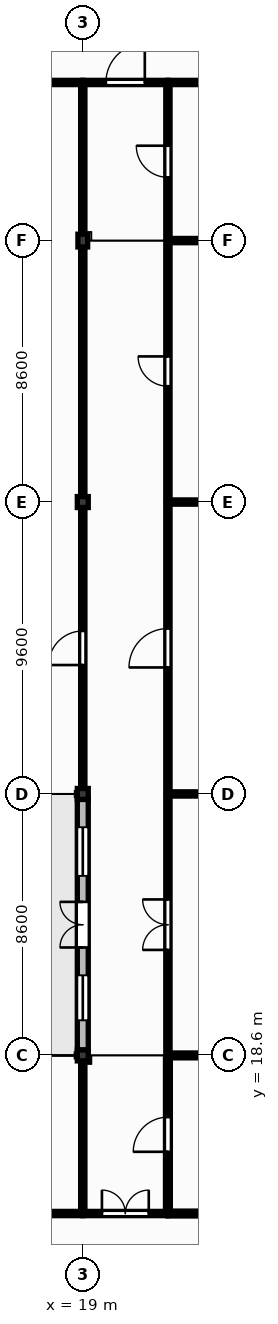
"""IFC4 building model, lengths in metres.
Left out: names, types, materials, properties, quantities, classifications, styles, units other than length and angle.
Written with IfcOpenShell. Run it as: python <this file> out.ifc"""

import sys

from ifc_helpers import new_model, si_unit, direction, frame, frame_2d, origin, origin_2d, place, context, subcontext, project, spatial, rectangle, extrude, element, fill, save


model = new_model("IFC4")
c1 = context("Model", 3, precision=1e-05, world=origin(), true_north=direction((0.0, 1.0)))
c2 = subcontext(c1, "Body", "Model", "MODEL_VIEW")
j1 = project(units=[si_unit("LENGTHUNIT", "METRE"), si_unit("PLANEANGLEUNIT", "RADIAN")], contexts=[c1])
p1 = place(None, origin())
s1 = spatial("IfcSite", under=j1, at=p1, CompositionType="ELEMENT")
p2 = place(p1, origin())
s2 = spatial("IfcBuilding", under=s1, at=p2, CompositionType="ELEMENT")
p3 = place(p2, frame((0.0, 0.0, 4.5)))
s3 = spatial("IfcBuildingStorey", under=s2, at=p3, CompositionType="ELEMENT", Elevation=4.5)
for number, where, z_axis, x_axis in (
    (1, (19.0, 18.6, 0.0), (0.0, 0.0, 1.0), (1.0, 0.0, 0.0)),
    (2, (19.0, 27.2, 0.0), (0.0, 0.0, 1.0), (1.0, 0.0, 0.0)),
    (3, (19.0, 36.8, 0.0), (0.0, 0.0, 1.0), (1.0, 0.0, 0.0)),
):
    element("IfcColumn", number, at=place(p3, frame(where, z_axis=z_axis, x_axis=x_axis)), inside=s3, PredefinedType="COLUMN", context=c2, shape_type="SweptSolid", body=[
        extrude(rectangle(XDim=0.36, YDim=0.36, at=origin_2d()), origin(), (0.0, 0.0, 1.0), 4.26),
    ])
p4 = place(p3, frame((19.0, 45.4, 0.0), z_axis=(0.0, 0.0, 1.0), x_axis=(1.0, 0.0, 0.0)))
e4 = element("IfcColumn", 4, at=p4, inside=s3, PredefinedType="COLUMN", context=c2, shape_type="SweptSolid", body=[
    extrude(rectangle(XDim=0.32, YDim=0.42, at=origin_2d()), origin(), (0.0, 0.0, 1.0), 4.26),
])
p5 = place(p3, frame((19.0, 18.78, 0.0), z_axis=(0.0, 0.0, 1.0), x_axis=(0.0, 1.0, 0.0)))
e5 = element("IfcWall", 5, at=p5, inside=s3, PredefinedType="SOLIDWALL", context=c2, shape_type="SweptSolid", body=[
    extrude(rectangle(XDim=8.24, YDim=0.36, at=frame_2d((4.12, 0.0))), origin(), (0.0, 0.0, 1.0), 3.8),
])
p6 = place(p5, frame((3.37, 0.0, 0.0)))
e6 = element("IfcOpeningElement", 6, at=p6, cuts=e5, PredefinedType="OPENING", context=c2, shape_type="SweptSolid", body=[
    extrude(rectangle(XDim=1.5, YDim=2.3, at=frame_2d((0.75, 1.15))), frame((0.0, 0.19, 0.0), z_axis=(0.0, -1.0, 0.0), x_axis=(1.0, 0.0, 0.0)), (0.0, 0.0, 1.0), 0.38),
])
p7 = place(p5, frame((0.975, 0.0, 1.0)))
e7 = element("IfcOpeningElement", 7, at=p7, cuts=e5, PredefinedType="OPENING", context=c2, shape_type="SweptSolid", body=[
    extrude(rectangle(XDim=1.48, YDim=2.2, at=frame_2d((0.74, 1.1))), frame((0.0, 0.19, 0.0), z_axis=(0.0, -1.0, 0.0), x_axis=(1.0, 0.0, 0.0)), (0.0, 0.0, 1.0), 0.38),
])
p8 = place(p5, frame((5.725, 0.0, 1.0)))
e8 = element("IfcOpeningElement", 8, at=p8, cuts=e5, PredefinedType="OPENING", context=c2, shape_type="SweptSolid", body=[
    extrude(rectangle(XDim=1.6, YDim=2.2, at=frame_2d((0.8, 1.1))), frame((0.0, 0.19, 0.0), z_axis=(0.0, -1.0, 0.0), x_axis=(1.0, 0.0, 0.0)), (0.0, 0.0, 1.0), 0.38),
])
p9 = place(p3, frame((11.8, 13.4, 0.0), z_axis=(0.0, 0.0, 1.0), x_axis=(1.0, 0.0, 0.0)))
e9 = element("IfcWall", 9, at=p9, inside=s3, PredefinedType="PARTITIONING", context=c2, shape_type="SweptSolid", body=[
    extrude(rectangle(XDim=7.2, YDim=0.14, at=frame_2d((3.6, 0.0))), origin(), (0.0, 0.0, 1.0), 4.18),
])
p10 = place(p9, frame((3.08, 0.0, 0.0)))
e10 = element("IfcOpeningElement", 10, at=p10, cuts=e9, PredefinedType="OPENING", context=c2, shape_type="SweptSolid", body=[
    extrude(rectangle(XDim=1.04, YDim=2.1, at=frame_2d((0.52, 1.05))), frame((0.0, 0.08, 0.0), z_axis=(0.0, -1.0, 0.0), x_axis=(1.0, 0.0, 0.0)), (0.0, 0.0, 1.0), 0.16),
])
p11 = place(p3, frame((15.8, 50.6, 0.0), z_axis=(0.0, 0.0, 1.0), x_axis=(1.0, 0.0, 0.0)))
e11 = element("IfcWall", 11, at=p11, inside=s3, PredefinedType="PARTITIONING", context=c2, shape_type="SweptSolid", body=[
    extrude(rectangle(XDim=3.2, YDim=0.14, at=frame_2d((1.6, 0.0))), origin(), (0.0, 0.0, 1.0), 4.18),
])
p12 = place(p11, frame((1.08, 0.0, 0.0)))
e12 = element("IfcOpeningElement", 12, at=p12, cuts=e11, PredefinedType="OPENING", context=c2, shape_type="SweptSolid", body=[
    extrude(rectangle(XDim=1.04, YDim=2.1, at=frame_2d((0.52, 1.05))), frame((0.0, 0.08, 0.0), z_axis=(0.0, -1.0, 0.0), x_axis=(1.0, 0.0, 0.0)), (0.0, 0.0, 1.0), 0.16),
])
p13 = place(p3, frame((19.0, 13.47, 0.0), z_axis=(0.0, 0.0, 1.0), x_axis=(0.0, 1.0, 0.0)))
e13 = element("IfcWall", 13, at=p13, inside=s3, PredefinedType="PARTITIONING", context=c2, shape_type="SweptSolid", body=[
    extrude(rectangle(XDim=4.95, YDim=0.14, at=frame_2d((2.475, 0.0))), origin(), (0.0, 0.0, 1.0), 3.74),
])
p14 = place(p3, frame((19.0, 13.4, 0.0), z_axis=(0.0, 0.0, 1.0), x_axis=(1.0, 0.0, 0.0)))
e14 = element("IfcWall", 14, at=p14, inside=s3, PredefinedType="PARTITIONING", context=c2, shape_type="SweptSolid", body=[
    extrude(rectangle(XDim=2.8, YDim=0.14, at=frame_2d((1.4, 0.0))), origin(), (0.0, 0.0, 1.0), 4.18),
])
p15 = place(p14, frame((0.63, 0.0, 0.0)))
e15 = element("IfcOpeningElement", 15, at=p15, cuts=e14, PredefinedType="OPENING", context=c2, shape_type="SweptSolid", body=[
    extrude(rectangle(XDim=1.54, YDim=2.25, at=frame_2d((0.77, 1.125))), frame((0.0, 0.08, 0.0), z_axis=(0.0, -1.0, 0.0), x_axis=(1.0, 0.0, 0.0)), (0.0, 0.0, 1.0), 0.16),
])
p16 = place(p3, frame((19.0, 27.38, 0.0), z_axis=(0.0, 0.0, 1.0), x_axis=(0.0, 1.0, 0.0)))
e16 = element("IfcWall", 16, at=p16, inside=s3, PredefinedType="PARTITIONING", context=c2, shape_type="SweptSolid", body=[
    extrude(rectangle(XDim=9.24, YDim=0.14, at=frame_2d((4.62, 0.0))), origin(), (0.0, 0.0, 1.0), 3.62),
])
p17 = place(p16, frame((4.06, 0.0, 0.0)))
e17 = element("IfcOpeningElement", 17, at=p17, cuts=e16, PredefinedType="OPENING", context=c2, shape_type="SweptSolid", body=[
    extrude(rectangle(XDim=1.12, YDim=2.15, at=frame_2d((0.56, 1.075))), frame((0.0, 0.08, 0.0), z_axis=(0.0, -1.0, 0.0), x_axis=(1.0, 0.0, 0.0)), (0.0, 0.0, 1.0), 0.16),
])
p18 = place(p3, frame((19.0, 36.98, 0.0), z_axis=(0.0, 0.0, 1.0), x_axis=(0.0, 1.0, 0.0)))
e18 = element("IfcWall", 18, at=p18, inside=s3, PredefinedType="PARTITIONING", context=c2, shape_type="SweptSolid", body=[
    extrude(rectangle(XDim=8.21, YDim=0.14, at=frame_2d((4.105, 0.0))), origin(), (0.0, 0.0, 1.0), 3.62),
])
p19 = place(p3, frame((19.0, 45.61, 0.0), z_axis=(0.0, 0.0, 1.0), x_axis=(0.0, 1.0, 0.0)))
e19 = element("IfcWall", 19, at=p19, inside=s3, PredefinedType="PARTITIONING", context=c2, shape_type="SweptSolid", body=[
    extrude(rectangle(XDim=4.92, YDim=0.14, at=frame_2d((2.46, 0.0))), origin(), (0.0, 0.0, 1.0), 3.74),
])
p20 = place(p3, frame((19.0, 50.6, 0.0), z_axis=(0.0, 0.0, 1.0), x_axis=(1.0, 0.0, 0.0)))
e20 = element("IfcWall", 20, at=p20, inside=s3, PredefinedType="PARTITIONING", context=c2, shape_type="SweptSolid", body=[
    extrude(rectangle(XDim=2.8, YDim=0.14, at=frame_2d((1.4, 0.0))), origin(), (0.0, 0.0, 1.0), 4.18),
])
p21 = place(p20, frame((0.76, 0.0, 0.0)))
e21 = element("IfcOpeningElement", 21, at=p21, cuts=e20, PredefinedType="OPENING", context=c2, shape_type="SweptSolid", body=[
    extrude(rectangle(XDim=1.28, YDim=2.2, at=frame_2d((0.64, 1.1))), frame((0.0, 0.08, 0.0), z_axis=(0.0, -1.0, 0.0), x_axis=(1.0, 0.0, 0.0)), (0.0, 0.0, 1.0), 0.16),
])
p22 = place(p3, frame((21.8, 13.47, 0.0), z_axis=(0.0, 0.0, 1.0), x_axis=(0.0, 1.0, 0.0)))
e22 = element("IfcWall", 22, at=p22, inside=s3, PredefinedType="PARTITIONING", context=c2, shape_type="SweptSolid", body=[
    extrude(rectangle(XDim=5.06, YDim=0.16, at=frame_2d((2.53, 0.0))), origin(), (0.0, 0.0, 1.0), 4.18),
])
p23 = place(p22, frame((1.96, 0.0, 0.0)))
e23 = element("IfcOpeningElement", 23, at=p23, cuts=e22, PredefinedType="OPENING", context=c2, shape_type="SweptSolid", body=[
    extrude(rectangle(XDim=1.14, YDim=2.15, at=frame_2d((0.57, 1.075))), frame((0.0, 0.09, 0.0), z_axis=(0.0, -1.0, 0.0), x_axis=(1.0, 0.0, 0.0)), (0.0, 0.0, 1.0), 0.18),
])
p24 = place(p3, frame((21.8, 13.4, 0.0), z_axis=(0.0, 0.0, 1.0), x_axis=(1.0, 0.0, 0.0)))
e24 = element("IfcWall", 24, at=p24, inside=s3, PredefinedType="PARTITIONING", context=c2, shape_type="SweptSolid", body=[
    extrude(rectangle(XDim=4.4, YDim=0.16, at=frame_2d((2.2, 0.0))), origin(), (0.0, 0.0, 1.0), 4.18),
])
p25 = place(p3, frame((21.8, 18.67, 0.0), z_axis=(0.0, 0.0, 1.0), x_axis=(0.0, 1.0, 0.0)))
e25 = element("IfcWall", 25, at=p25, inside=s3, PredefinedType="PARTITIONING", context=c2, shape_type="SweptSolid", body=[
    extrude(rectangle(XDim=8.46, YDim=0.14, at=frame_2d((4.23, 0.0))), origin(), (0.0, 0.0, 1.0), 4.18),
])
p26 = place(p25, frame((3.4, 0.0, 0.0)))
e26 = element("IfcOpeningElement", 26, at=p26, cuts=e25, PredefinedType="OPENING", context=c2, shape_type="SweptSolid", body=[
    extrude(rectangle(XDim=1.66, YDim=2.3, at=frame_2d((0.83, 1.15))), frame((0.0, 0.08, 0.0), z_axis=(0.0, -1.0, 0.0), x_axis=(1.0, 0.0, 0.0)), (0.0, 0.0, 1.0), 0.16),
])
p27 = place(p3, frame((21.8, 18.6, 0.0), z_axis=(0.0, 0.0, 1.0), x_axis=(1.0, 0.0, 0.0)))
e27 = element("IfcWall", 27, at=p27, inside=s3, PredefinedType="PARTITIONING", context=c2, shape_type="SweptSolid", body=[
    extrude(rectangle(XDim=4.24, YDim=0.16, at=frame_2d((2.12, 0.0))), origin(), (0.0, 0.0, 1.0), 3.62),
])
p28 = place(p3, frame((21.8, 27.27, 0.0), z_axis=(0.0, 0.0, 1.0), x_axis=(0.0, 1.0, 0.0)))
e28 = element("IfcWall", 28, at=p28, inside=s3, PredefinedType="PARTITIONING", context=c2, shape_type="SweptSolid", body=[
    extrude(rectangle(XDim=9.46, YDim=0.14, at=frame_2d((4.73, 0.0))), origin(), (0.0, 0.0, 1.0), 4.18),
])
p29 = place(p28, frame((4.09, 0.0, 0.0)))
e29 = element("IfcOpeningElement", 29, at=p29, cuts=e28, PredefinedType="OPENING", context=c2, shape_type="SweptSolid", body=[
    extrude(rectangle(XDim=1.28, YDim=2.2, at=frame_2d((0.64, 1.1))), frame((0.0, 0.08, 0.0), z_axis=(0.0, -1.0, 0.0), x_axis=(1.0, 0.0, 0.0)), (0.0, 0.0, 1.0), 0.16),
])
p30 = place(p3, frame((21.8, 27.2, 0.0), z_axis=(0.0, 0.0, 1.0), x_axis=(1.0, 0.0, 0.0)))
e30 = element("IfcWall", 30, at=p30, inside=s3, PredefinedType="PARTITIONING", context=c2, shape_type="SweptSolid", body=[
    extrude(rectangle(XDim=4.22, YDim=0.14, at=frame_2d((2.11, 0.0))), origin(), (0.0, 0.0, 1.0), 3.66),
])
p31 = place(p3, frame((21.8, 36.87, 0.0), z_axis=(0.0, 0.0, 1.0), x_axis=(0.0, 1.0, 0.0)))
e31 = element("IfcWall", 31, at=p31, inside=s3, PredefinedType="PARTITIONING", context=c2, shape_type="SweptSolid", body=[
    extrude(rectangle(XDim=8.46, YDim=0.14, at=frame_2d((4.23, 0.0))), origin(), (0.0, 0.0, 1.0), 4.18),
])
p32 = place(p31, frame((3.74, 0.0, 0.0)))
e32 = element("IfcOpeningElement", 32, at=p32, cuts=e31, PredefinedType="OPENING", context=c2, shape_type="SweptSolid", body=[
    extrude(rectangle(XDim=0.98, YDim=2.15, at=frame_2d((0.49, 1.075))), frame((0.0, 0.08, 0.0), z_axis=(0.0, -1.0, 0.0), x_axis=(1.0, 0.0, 0.0)), (0.0, 0.0, 1.0), 0.16),
])
p33 = place(p3, frame((21.8, 36.8, 0.0), z_axis=(0.0, 0.0, 1.0), x_axis=(1.0, 0.0, 0.0)))
e33 = element("IfcWall", 33, at=p33, inside=s3, PredefinedType="PARTITIONING", context=c2, shape_type="SweptSolid", body=[
    extrude(rectangle(XDim=4.22, YDim=0.14, at=frame_2d((2.11, 0.0))), origin(), (0.0, 0.0, 1.0), 3.62),
])
p34 = place(p3, frame((21.8, 45.47, 0.0), z_axis=(0.0, 0.0, 1.0), x_axis=(0.0, 1.0, 0.0)))
e34 = element("IfcWall", 34, at=p34, inside=s3, PredefinedType="PARTITIONING", context=c2, shape_type="SweptSolid", body=[
    extrude(rectangle(XDim=5.06, YDim=0.14, at=frame_2d((2.53, 0.0))), origin(), (0.0, 0.0, 1.0), 4.18),
])
p35 = place(p34, frame((2.01, 0.0, 0.0)))
e35 = element("IfcOpeningElement", 35, at=p35, cuts=e34, PredefinedType="OPENING", context=c2, shape_type="SweptSolid", body=[
    extrude(rectangle(XDim=1.04, YDim=2.1, at=frame_2d((0.52, 1.05))), frame((0.0, 0.08, 0.0), z_axis=(0.0, -1.0, 0.0), x_axis=(1.0, 0.0, 0.0)), (0.0, 0.0, 1.0), 0.16),
])
p36 = place(p3, frame((21.8, 45.4, 0.0), z_axis=(0.0, 0.0, 1.0), x_axis=(1.0, 0.0, 0.0)))
e36 = element("IfcWall", 36, at=p36, inside=s3, PredefinedType="PARTITIONING", context=c2, shape_type="SweptSolid", body=[
    extrude(rectangle(XDim=4.22, YDim=0.14, at=frame_2d((2.11, 0.0))), origin(), (0.0, 0.0, 1.0), 3.66),
])
p37 = place(p3, frame((21.8, 50.6, 0.0), z_axis=(0.0, 0.0, 1.0), x_axis=(1.0, 0.0, 0.0)))
e37 = element("IfcWall", 37, at=p37, inside=s3, PredefinedType="PARTITIONING", context=c2, shape_type="SweptSolid", body=[
    extrude(rectangle(XDim=4.4, YDim=0.14, at=frame_2d((2.2, 0.0))), origin(), (0.0, 0.0, 1.0), 4.18),
])
p38 = place(p6, origin())
e38 = element("IfcDoor", 38, at=p38, inside=s3, OperationType="DOUBLE_DOOR_SINGLE_SWING", PredefinedType="DOOR", context=c2, shape_type="SweptSolid", body=[
    extrude(rectangle(XDim=1.5, YDim=2.3, at=frame_2d((0.75, 1.15))), frame((0.0, 0.025, 0.0), z_axis=(0.0, -1.0, 0.0), x_axis=(1.0, 0.0, 0.0)), (0.0, 0.0, 1.0), 0.05),
])
fill(e6, e38)
p39 = place(p7, origin())
e39 = element("IfcWindow", 39, at=p39, inside=s3, PartitioningType="SINGLE_PANEL", PredefinedType="WINDOW", context=c2, shape_type="SweptSolid", body=[
    extrude(rectangle(XDim=1.48, YDim=2.2, at=frame_2d((0.74, 1.1))), frame((0.0, 0.03, 0.0), z_axis=(0.0, -1.0, 0.0), x_axis=(1.0, 0.0, 0.0)), (0.0, 0.0, 1.0), 0.06),
])
fill(e7, e39)
p40 = place(p8, origin())
e40 = element("IfcWindow", 40, at=p40, inside=s3, PartitioningType="DOUBLE_PANEL_VERTICAL", PredefinedType="WINDOW", context=c2, shape_type="SweptSolid", body=[
    extrude(rectangle(XDim=1.6, YDim=2.2, at=frame_2d((0.8, 1.1))), frame((0.0, 0.03, 0.0), z_axis=(0.0, -1.0, 0.0), x_axis=(1.0, 0.0, 0.0)), (0.0, 0.0, 1.0), 0.06),
])
fill(e8, e40)
p41 = place(p21, origin())
e41 = element("IfcDoor", 41, at=p41, inside=s3, OperationType="SINGLE_SWING_RIGHT", PredefinedType="DOOR", context=c2, shape_type="SweptSolid", body=[
    extrude(rectangle(XDim=1.28, YDim=2.2, at=frame_2d((0.64, 1.1))), frame((0.0, 0.025, 0.0), z_axis=(0.0, -1.0, 0.0), x_axis=(1.0, 0.0, 0.0)), (0.0, 0.0, 1.0), 0.05),
])
fill(e21, e41)
p42 = place(p17, origin())
e42 = element("IfcDoor", 42, at=p42, inside=s3, OperationType="SINGLE_SWING_LEFT", PredefinedType="DOOR", context=c2, shape_type="SweptSolid", body=[
    extrude(rectangle(XDim=1.12, YDim=2.15, at=frame_2d((0.56, 1.075))), frame((0.0, 0.025, 0.0), z_axis=(0.0, -1.0, 0.0), x_axis=(1.0, 0.0, 0.0)), (0.0, 0.0, 1.0), 0.05),
])
fill(e17, e42)
p43 = place(p15, origin())
e43 = element("IfcDoor", 43, at=p43, inside=s3, OperationType="DOUBLE_DOOR_SINGLE_SWING", PredefinedType="DOOR", context=c2, shape_type="SweptSolid", body=[
    extrude(rectangle(XDim=1.54, YDim=2.25, at=frame_2d((0.77, 1.125))), frame((0.0, 0.025, 0.0), z_axis=(0.0, -1.0, 0.0), x_axis=(1.0, 0.0, 0.0)), (0.0, 0.0, 1.0), 0.05),
])
fill(e15, e43)
p44 = place(p29, origin())
e44 = element("IfcDoor", 44, at=p44, inside=s3, OperationType="SINGLE_SWING_LEFT", PredefinedType="DOOR", context=c2, shape_type="SweptSolid", body=[
    extrude(rectangle(XDim=1.28, YDim=2.2, at=frame_2d((0.64, 1.1))), frame((0.0, 0.025, 0.0), z_axis=(0.0, -1.0, 0.0), x_axis=(1.0, 0.0, 0.0)), (0.0, 0.0, 1.0), 0.05),
])
fill(e29, e44)
p45 = place(p26, origin())
e45 = element("IfcDoor", 45, at=p45, inside=s3, OperationType="DOUBLE_DOOR_SINGLE_SWING", PredefinedType="DOOR", context=c2, shape_type="SweptSolid", body=[
    extrude(rectangle(XDim=1.66, YDim=2.3, at=frame_2d((0.83, 1.15))), frame((0.0, 0.025, 0.0), z_axis=(0.0, -1.0, 0.0), x_axis=(1.0, 0.0, 0.0)), (0.0, 0.0, 1.0), 0.05),
])
fill(e26, e45)
p46 = place(p32, origin())
e46 = element("IfcDoor", 46, at=p46, inside=s3, OperationType="SINGLE_SWING_RIGHT", PredefinedType="DOOR", context=c2, shape_type="SweptSolid", body=[
    extrude(rectangle(XDim=0.98, YDim=2.15, at=frame_2d((0.49, 1.075))), frame((0.0, 0.025, 0.0), z_axis=(0.0, -1.0, 0.0), x_axis=(1.0, 0.0, 0.0)), (0.0, 0.0, 1.0), 0.05),
])
fill(e32, e46)
p47 = place(p35, origin())
e47 = element("IfcDoor", 47, at=p47, inside=s3, OperationType="SINGLE_SWING_RIGHT", PredefinedType="DOOR", context=c2, shape_type="SweptSolid", body=[
    extrude(rectangle(XDim=1.04, YDim=2.1, at=frame_2d((0.52, 1.05))), frame((0.0, 0.025, 0.0), z_axis=(0.0, -1.0, 0.0), x_axis=(1.0, 0.0, 0.0)), (0.0, 0.0, 1.0), 0.05),
])
fill(e35, e47)
p48 = place(p23, origin())
e48 = element("IfcDoor", 48, at=p48, inside=s3, OperationType="SINGLE_SWING_LEFT", PredefinedType="DOOR", context=c2, shape_type="SweptSolid", body=[
    extrude(rectangle(XDim=1.14, YDim=2.15, at=frame_2d((0.57, 1.075))), frame((0.0, 0.025, 0.0), z_axis=(0.0, -1.0, 0.0), x_axis=(1.0, 0.0, 0.0)), (0.0, 0.0, 1.0), 0.05),
])
fill(e23, e48)
save(model, sys.argv[1])
